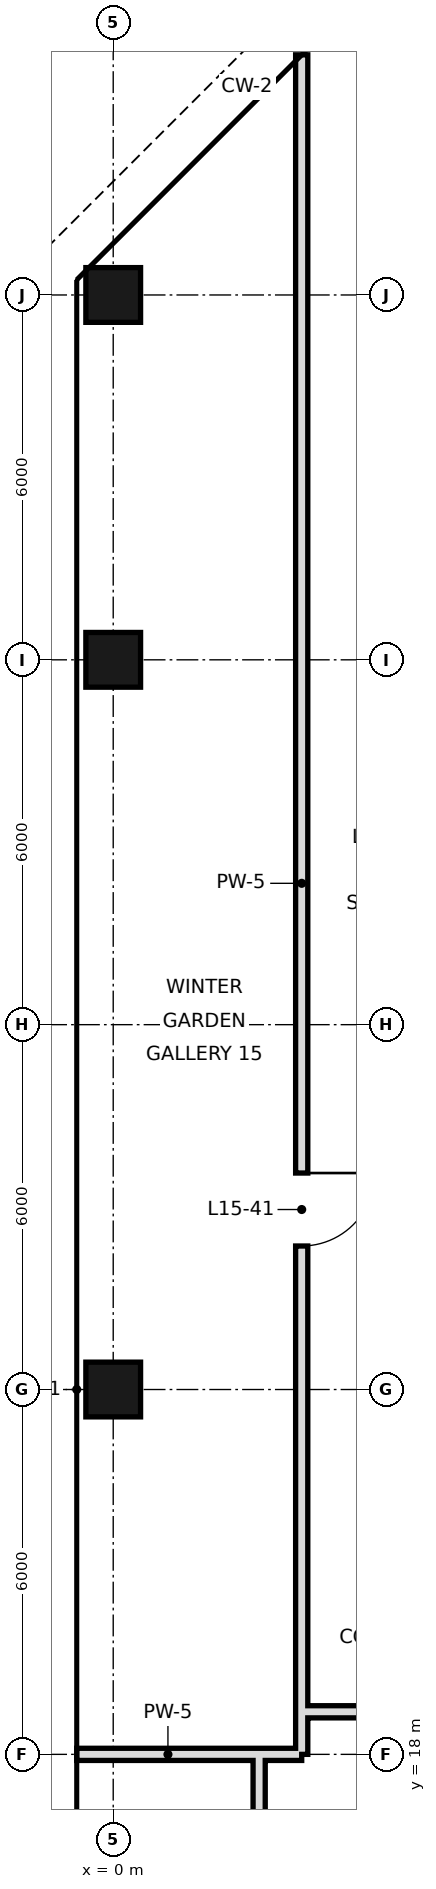
"""IFC4 building model, lengths in metres.
Left out: names, types, materials, properties, quantities, classifications, styles, units other than length and angle.
Written with IfcOpenShell. Run it as: python <this file> out.ifc"""

import sys

from ifc_helpers import new_model, si_unit, direction, frame, frame_2d, origin, origin_2d, place, context, subcontext, project, spatial, rectangle, hollow_rectangle, extrude, element, fill, save


model = new_model("IFC4")
c1 = context("Model", 3, precision=1e-05, world=origin(), true_north=direction((0.0, 1.0)))
c2 = subcontext(c1, "Body", "Model", "MODEL_VIEW")
j1 = project(units=[si_unit("LENGTHUNIT", "METRE"), si_unit("PLANEANGLEUNIT", "RADIAN")], contexts=[c1])
p1 = place(None, origin())
s1 = spatial("IfcSite", under=j1, at=p1, CompositionType="ELEMENT")
p2 = place(p1, origin())
s2 = spatial("IfcBuilding", under=s1, at=p2, CompositionType="ELEMENT")
p3 = place(p2, frame((0.0, 0.0, 75.0)))
s3 = spatial("IfcBuildingStorey", under=s2, at=p3, CompositionType="ELEMENT", Elevation=75.0)
for number, where, z_axis, x_axis in (
    (1, (0.0, 24.0, 0.0), (0.0, 0.0, 1.0), (1.0, 0.0, 0.0)),
    (2, (0.0, 36.0, 0.0), (0.0, 0.0, 1.0), (1.0, 0.0, 0.0)),
    (3, (0.0, 42.0, 0.0), (0.0, 0.0, 1.0), (1.0, 0.0, 0.0)),
):
    element("IfcColumn", number, at=place(p3, frame(where, z_axis=z_axis, x_axis=x_axis)), inside=s3, PredefinedType="COLUMN", context=c2, shape_type="SweptSolid", body=[
        extrude(hollow_rectangle(XDim=0.9, YDim=0.9, WallThickness=0.045, at=origin_2d()), origin(), (0.0, 0.0, 1.0), 3.6),
    ])
p4 = place(p3, frame((2.4, 10.8, 0.0), z_axis=(0.0, 0.0, 1.0), x_axis=(0.0, 1.0, 0.0)))
e4 = element("IfcWall", 4, at=p4, inside=s3, PredefinedType="SOLIDWALL", context=c2, shape_type="SweptSolid", body=[
    extrude(rectangle(XDim=7.2, YDim=0.2, at=frame_2d((3.6, 0.0))), origin(), (0.0, 0.0, 1.0), 2.72),
])
p5 = place(p3, frame((3.1, 18.7, 0.0), z_axis=(0.0, 0.0, 1.0), x_axis=(0.0, 1.0, 0.0)))
e5 = element("IfcWall", 5, at=p5, inside=s3, PredefinedType="SOLIDWALL", context=c2, shape_type="SweptSolid", body=[
    extrude(rectangle(XDim=27.249, YDim=0.2, at=frame_2d((13.625, 0.0))), origin(), (0.0, 0.0, 1.0), 2.97),
])
p6 = place(p5, frame((7.66, 0.0, 0.0)))
e6 = element("IfcOpeningElement", 6, at=p6, cuts=e5, PredefinedType="OPENING", context=c2, shape_type="SweptSolid", body=[
    extrude(rectangle(XDim=1.2, YDim=2.4, at=frame_2d((0.6, 1.2))), frame((0.0, 0.11, 0.0), z_axis=(0.0, -1.0, 0.0), x_axis=(1.0, 0.0, 0.0)), (0.0, 0.0, 1.0), 0.22),
])
p7 = place(p3, frame((3.1, 18.0, 0.0), z_axis=(0.0, 0.0, 1.0), x_axis=(0.0, 1.0, 0.0)))
e7 = element("IfcWall", 7, at=p7, inside=s3, PredefinedType="SOLIDWALL", context=c2, shape_type="SweptSolid", body=[
    extrude(rectangle(XDim=0.7, YDim=0.2, at=frame_2d((0.35, 0.0))), origin(), (0.0, 0.0, 1.0), 2.97),
])
p8 = place(p3, frame((-0.6, 18.0, 0.0), z_axis=(0.0, 0.0, 1.0), x_axis=(1.0, 0.0, 0.0)))
e8 = element("IfcWall", 8, at=p8, inside=s3, PredefinedType="SOLIDWALL", context=c2, shape_type="SweptSolid", body=[
    extrude(rectangle(XDim=3.0, YDim=0.2, at=frame_2d((1.5, 0.0))), origin(), (0.0, 0.0, 1.0), 2.72),
])
p9 = place(p3, frame((2.4, 18.0, 0.0), z_axis=(0.0, 0.0, 1.0), x_axis=(1.0, 0.0, 0.0)))
e9 = element("IfcWall", 9, at=p9, inside=s3, PredefinedType="SOLIDWALL", context=c2, shape_type="SweptSolid", body=[
    extrude(rectangle(XDim=0.7, YDim=0.2, at=frame_2d((0.35, 0.0))), origin(), (0.0, 0.0, 1.0), 2.97),
])
p10 = place(p3, frame((3.1, 18.7, 0.0), z_axis=(0.0, 0.0, 1.0), x_axis=(1.0, 0.0, 0.0)))
e10 = element("IfcWall", 10, at=p10, inside=s3, PredefinedType="SOLIDWALL", context=c2, shape_type="SweptSolid", body=[
    extrude(rectangle(XDim=3.5, YDim=0.2, at=frame_2d((1.75, 0.0))), origin(), (0.0, 0.0, 1.0), 2.72),
])
p11 = place(p6, origin())
e11 = element("IfcDoor", 11, at=p11, inside=s3, OperationType="SINGLE_SWING_RIGHT", PredefinedType="DOOR", context=c2, shape_type="SweptSolid", body=[
    extrude(rectangle(XDim=1.2, YDim=2.4, at=frame_2d((0.6, 1.2))), frame((0.0, 0.025, 0.0), z_axis=(0.0, -1.0, 0.0), x_axis=(1.0, 0.0, 0.0)), (0.0, 0.0, 1.0), 0.05),
])
fill(e6, e11)
save(model, sys.argv[1])
